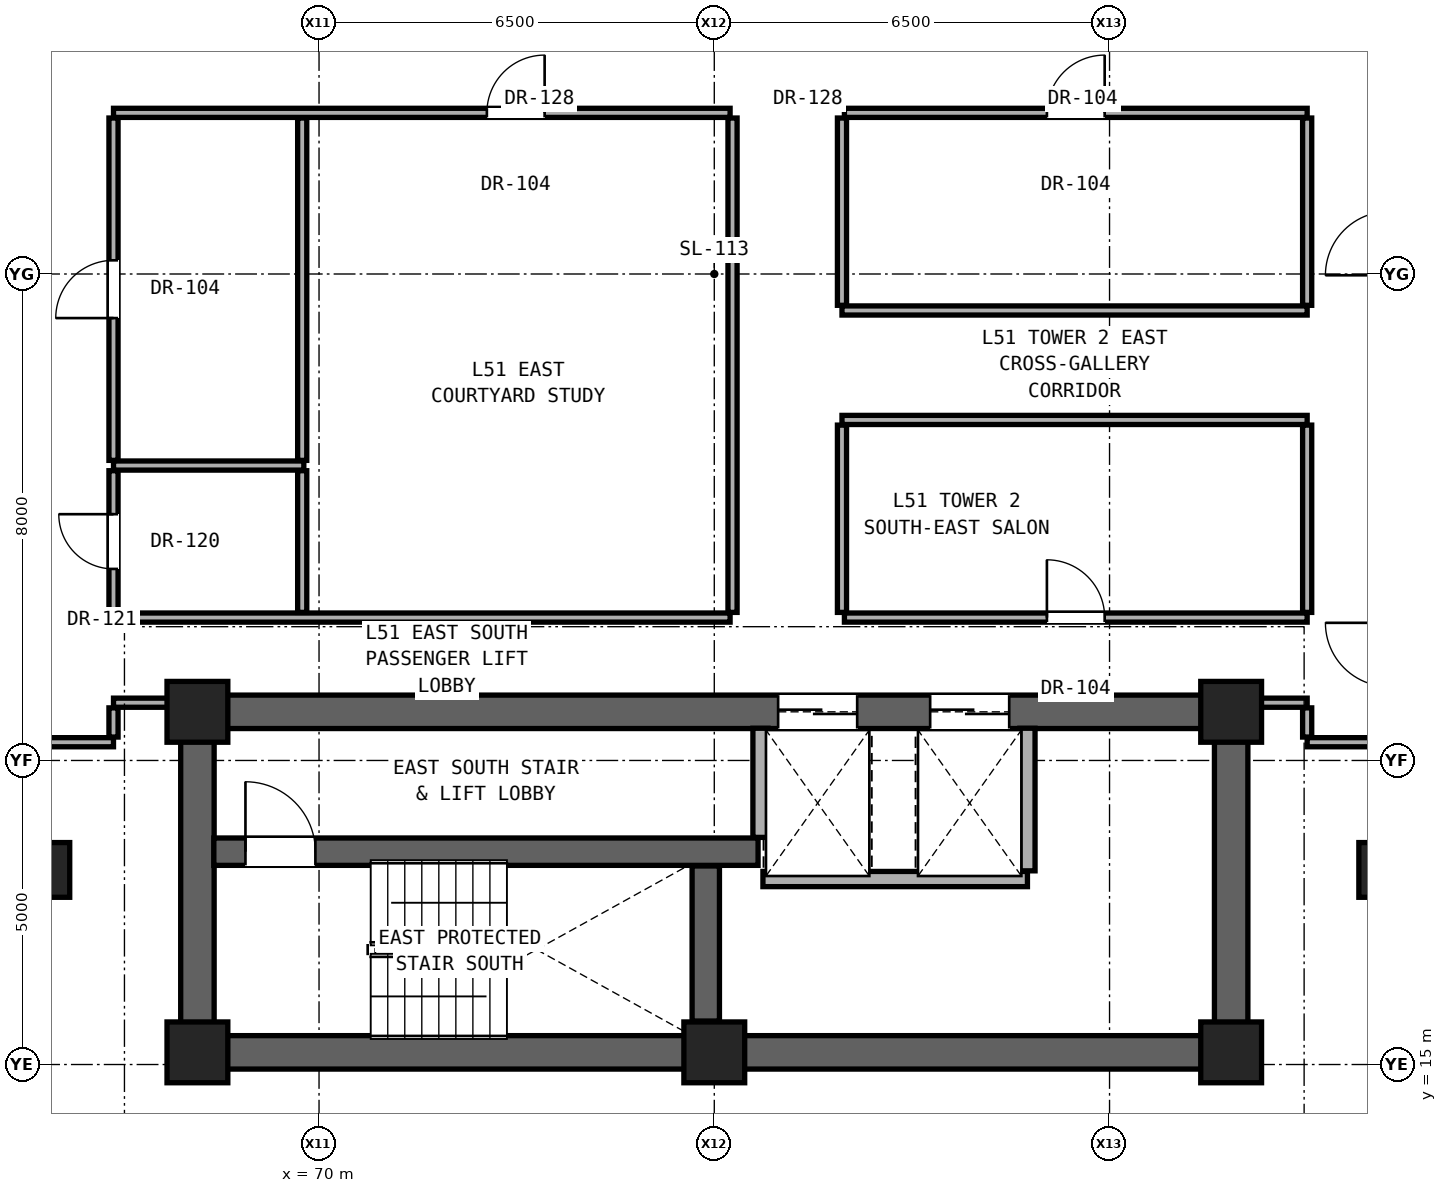
"""IFC4 building model, lengths in metres.
Left out: names, types, materials, properties, quantities, classifications, styles, units other than length and angle.
Written with IfcOpenShell. Run it as: python <this file> out.ifc"""

import sys

from ifc_helpers import new_model, si_unit, direction, frame, frame_2d, origin, origin_2d, place, context, subcontext, project, spatial, rectangle, extrude, element, fill, save


model = new_model("IFC4")
c1 = context("Model", 3, precision=1e-05, world=origin(), true_north=direction((0.0, 1.0)))
c2 = subcontext(c1, "Body", "Model", "MODEL_VIEW")
j1 = project(units=[si_unit("LENGTHUNIT", "METRE"), si_unit("PLANEANGLEUNIT", "RADIAN")], contexts=[c1])
p1 = place(None, origin())
s1 = spatial("IfcSite", under=j1, at=p1, CompositionType="ELEMENT")
p2 = place(p1, origin())
s2 = spatial("IfcBuilding", under=s1, at=p2, CompositionType="ELEMENT")
p3 = place(p2, frame((0.0, 0.0, 180.4)))
s3 = spatial("IfcBuildingStorey", under=s2, at=p3, CompositionType="ELEMENT", Elevation=180.4)
for number, where, z_axis, x_axis in (
    (1, (68.0, 15.2, 0.0), (0.0, 0.0, 1.0), (1.0, 0.0, 0.0)),
    (2, (76.5, 15.2, 0.0), (0.0, 0.0, 1.0), (1.0, 0.0, 0.0)),
    (3, (85.0, 15.2, 0.0), (0.0, 0.0, 1.0), (1.0, 0.0, 0.0)),
    (4, (68.0, 20.8, 0.0), (0.0, 0.0, 1.0), (1.0, 0.0, 0.0)),
    (5, (85.0, 20.8, 0.0), (0.0, 0.0, 1.0), (1.0, 0.0, 0.0)),
):
    element("IfcColumn", number, at=place(p3, frame(where, z_axis=z_axis, x_axis=x_axis)), inside=s3, PredefinedType="COLUMN", context=c2, shape_type="SweptSolid", body=[
        extrude(rectangle(XDim=1.0, YDim=1.0, at=origin_2d()), origin(), (0.0, 0.0, 1.0), 3.25),
    ])
for number, where, z_axis, x_axis in (
    (6, (65.6, 18.2, 0.0), (0.0, 0.0, 1.0), (1.0, 0.0, 0.0)),
    (7, (87.4, 18.2, 0.0), (0.0, 0.0, 1.0), (1.0, 0.0, 0.0)),
):
    element("IfcColumn", number, at=place(p3, frame(where, z_axis=z_axis, x_axis=x_axis)), inside=s3, PredefinedType="PILASTER", context=c2, shape_type="SweptSolid", body=[
        extrude(rectangle(XDim=0.6, YDim=0.9, at=origin_2d()), origin(), (0.0, 0.0, 1.0), 3.25),
    ])
p4 = place(p3, frame((68.0, 15.2, 0.0), z_axis=(0.0, 0.0, 1.0), x_axis=(1.0, 0.0, 0.0)))
e8 = element("IfcWall", 8, at=p4, inside=s3, PredefinedType="SHEAR", context=c2, shape_type="SweptSolid", body=[
    extrude(rectangle(XDim=17.0, YDim=0.55, at=frame_2d((8.5, 0.0))), origin(), (0.0, 0.0, 1.0), 3.05),
])
for number, where, z_axis, x_axis in (
    (9, (68.0, 15.2, 0.0), (0.0, 0.0, 1.0), (0.0, 1.0, 0.0)),
    (10, (85.0, 15.2, 0.0), (0.0, 0.0, 1.0), (0.0, 1.0, 0.0)),
):
    element("IfcWall", number, at=place(p3, frame(where, z_axis=z_axis, x_axis=x_axis)), inside=s3, PredefinedType="SHEAR", context=c2, shape_type="SweptSolid", body=[
        extrude(rectangle(XDim=5.6, YDim=0.55, at=frame_2d((2.8, 0.0))), origin(), (0.0, 0.0, 1.0), 3.05),
    ])
p5 = place(p3, frame((68.0, 20.8, 0.0), z_axis=(0.0, 0.0, 1.0), x_axis=(1.0, 0.0, 0.0)))
e11 = element("IfcWall", 11, at=p5, inside=s3, PredefinedType="SHEAR", context=c2, shape_type="SweptSolid", body=[
    extrude(rectangle(XDim=17.0, YDim=0.55, at=frame_2d((8.5, 0.0))), origin(), (0.0, 0.0, 1.0), 3.05),
])
p6 = place(p5, frame((9.55, 0.0, 0.0)))
e12 = element("IfcOpeningElement", 12, at=p6, cuts=e11, PredefinedType="OPENING", context=c2, shape_type="SweptSolid", body=[
    extrude(rectangle(XDim=1.3, YDim=2.3, at=frame_2d((0.65, 1.15))), frame((0.0, 0.285, 0.0), z_axis=(0.0, -1.0, 0.0), x_axis=(1.0, 0.0, 0.0)), (0.0, 0.0, 1.0), 0.57),
])
p7 = place(p5, frame((12.05, 0.0, 0.0)))
e13 = element("IfcOpeningElement", 13, at=p7, cuts=e11, PredefinedType="OPENING", context=c2, shape_type="SweptSolid", body=[
    extrude(rectangle(XDim=1.3, YDim=2.3, at=frame_2d((0.65, 1.15))), frame((0.0, 0.285, 0.0), z_axis=(0.0, -1.0, 0.0), x_axis=(1.0, 0.0, 0.0)), (0.0, 0.0, 1.0), 0.57),
])
p8 = place(p3, frame((77.3, 18.05, 0.0), z_axis=(0.0, 0.0, 1.0), x_axis=(1.0, 0.0, 0.0)))
e14 = element("IfcWall", 14, at=p8, inside=s3, PredefinedType="SOLIDWALL", context=c2, shape_type="SweptSolid", body=[
    extrude(rectangle(XDim=4.35, YDim=0.25, at=frame_2d((2.175, 0.0))), origin(), (0.0, 0.0, 1.0), 3.05),
])
p9 = place(p3, frame((68.27, 18.5, 0.0), z_axis=(0.0, 0.0, 1.0), x_axis=(1.0, 0.0, 0.0)))
e15 = element("IfcWall", 15, at=p9, inside=s3, PredefinedType="SHEAR", context=c2, shape_type="SweptSolid", body=[
    extrude(rectangle(XDim=8.95, YDim=0.45, at=frame_2d((4.475, 0.0))), origin(), (0.0, 0.0, 1.0), 3.05),
])
p10 = place(p9, frame((0.52, 0.0, 0.0)))
e16 = element("IfcOpeningElement", 16, at=p10, cuts=e15, PredefinedType="OPENING", context=c2, shape_type="SweptSolid", body=[
    extrude(rectangle(XDim=1.15, YDim=2.2, at=frame_2d((0.575, 1.1))), frame((0.0, 0.235, 0.0), z_axis=(0.0, -1.0, 0.0), x_axis=(1.0, 0.0, 0.0)), (0.0, 0.0, 1.0), 0.47),
])
p11 = place(p3, frame((65.25, 20.3, 0.0), z_axis=(0.0, 0.0, 1.0), x_axis=(1.0, 0.0, 0.0)))
e17 = element("IfcWall", 17, at=p11, inside=s3, PredefinedType="PARTITIONING", context=c2, shape_type="SweptSolid", body=[
    extrude(rectangle(XDim=1.37, YDim=0.15, at=frame_2d((0.685, 0.0))), origin(), (0.0, 0.0, 1.0), 3.05),
])
p12 = place(p3, frame((86.25, 20.3, 0.0), z_axis=(0.0, 0.0, 1.0), x_axis=(1.0, 0.0, 0.0)))
e18 = element("IfcWall", 18, at=p12, inside=s3, PredefinedType="PARTITIONING", context=c2, shape_type="SweptSolid", body=[
    extrude(rectangle(XDim=1.35, YDim=0.15, at=frame_2d((0.675, 0.0))), origin(), (0.0, 0.0, 1.0), 3.05),
])
p13 = place(p3, frame((66.62, 20.95, 0.0), z_axis=(0.0, 0.0, 1.0), x_axis=(1.0, 0.0, 0.0)))
e19 = element("IfcWall", 19, at=p13, inside=s3, PredefinedType="PARTITIONING", context=c2, shape_type="SweptSolid", body=[
    extrude(rectangle(XDim=1.11, YDim=0.15, at=frame_2d((0.555, 0.0))), origin(), (0.0, 0.0, 1.0), 2.442),
])
p14 = place(p3, frame((85.27, 20.95, 0.0), z_axis=(0.0, 0.0, 1.0), x_axis=(1.0, 0.0, 0.0)))
e20 = element("IfcWall", 20, at=p14, inside=s3, PredefinedType="PARTITIONING", context=c2, shape_type="SweptSolid", body=[
    extrude(rectangle(XDim=0.98, YDim=0.15, at=frame_2d((0.49, 0.0))), origin(), (0.0, 0.0, 1.0), 2.442),
])
p15 = place(p3, frame((66.62, 22.35, 0.0), z_axis=(0.0, 0.0, 1.0), x_axis=(1.0, 0.0, 0.0)))
e21 = element("IfcWall", 21, at=p15, inside=s3, PredefinedType="PARTITIONING", context=c2, shape_type="SweptSolid", body=[
    extrude(rectangle(XDim=10.14, YDim=0.15, at=frame_2d((5.07, 0.0))), origin(), (0.0, 0.0, 1.0), 2.186),
])
p16 = place(p3, frame((78.64, 22.35, 0.0), z_axis=(0.0, 0.0, 1.0), x_axis=(1.0, 0.0, 0.0)))
e22 = element("IfcWall", 22, at=p16, inside=s3, PredefinedType="PARTITIONING", context=c2, shape_type="SweptSolid", body=[
    extrude(rectangle(XDim=7.61, YDim=0.15, at=frame_2d((3.805, 0.0))), origin(), (0.0, 0.0, 1.0), 2.186),
])
p17 = place(p16, frame((3.33, 0.0, 0.0)))
e23 = element("IfcOpeningElement", 23, at=p17, cuts=e22, PredefinedType="OPENING", context=c2, shape_type="SweptSolid", body=[
    extrude(rectangle(XDim=0.95, YDim=2.15, at=frame_2d((0.475, 1.075))), frame((0.0, 0.085, 0.0), z_axis=(0.0, -1.0, 0.0), x_axis=(1.0, 0.0, 0.0)), (0.0, 0.0, 1.0), 0.17),
])
p18 = place(p3, frame((66.62, 24.85, 0.0), z_axis=(0.0, 0.0, 1.0), x_axis=(1.0, 0.0, 0.0)))
e24 = element("IfcWall", 24, at=p18, inside=s3, PredefinedType="PARTITIONING", context=c2, shape_type="SweptSolid", body=[
    extrude(rectangle(XDim=3.13, YDim=0.15, at=frame_2d((1.565, 0.0))), origin(), (0.0, 0.0, 1.0), 2.186),
])
for number, where, z_axis, x_axis in (
    (25, (78.6, 25.6, 0.0), (0.0, 0.0, 1.0), (1.0, 0.0, 0.0)),
    (26, (78.6, 27.4, 0.0), (0.0, 0.0, 1.0), (1.0, 0.0, 0.0)),
):
    element("IfcWall", number, at=place(p3, frame(where, z_axis=z_axis, x_axis=x_axis)), inside=s3, PredefinedType="PARTITIONING", context=c2, shape_type="SweptSolid", body=[
        extrude(rectangle(XDim=7.65, YDim=0.15, at=frame_2d((3.825, 0.0))), origin(), (0.0, 0.0, 1.0), 2.186),
    ])
p19 = place(p3, frame((66.62, 30.65, 0.0), z_axis=(0.0, 0.0, 1.0), x_axis=(1.0, 0.0, 0.0)))
e27 = element("IfcWall", 27, at=p19, inside=s3, PredefinedType="PARTITIONING", context=c2, shape_type="SweptSolid", body=[
    extrude(rectangle(XDim=10.14, YDim=0.15, at=frame_2d((5.07, 0.0))), origin(), (0.0, 0.0, 1.0), 2.186),
])
p20 = place(p19, frame((6.14, 0.0, 0.0)))
e28 = element("IfcOpeningElement", 28, at=p20, cuts=e27, PredefinedType="OPENING", context=c2, shape_type="SweptSolid", body=[
    extrude(rectangle(XDim=0.95, YDim=2.15, at=frame_2d((0.475, 1.075))), frame((0.0, 0.085, 0.0), z_axis=(0.0, -1.0, 0.0), x_axis=(1.0, 0.0, 0.0)), (0.0, 0.0, 1.0), 0.17),
])
p21 = place(p3, frame((78.64, 30.65, 0.0), z_axis=(0.0, 0.0, 1.0), x_axis=(1.0, 0.0, 0.0)))
e29 = element("IfcWall", 29, at=p21, inside=s3, PredefinedType="PARTITIONING", context=c2, shape_type="SweptSolid", body=[
    extrude(rectangle(XDim=7.61, YDim=0.15, at=frame_2d((3.805, 0.0))), origin(), (0.0, 0.0, 1.0), 2.186),
])
p22 = place(p21, frame((3.33, 0.0, 0.0)))
e30 = element("IfcOpeningElement", 30, at=p22, cuts=e29, PredefinedType="OPENING", context=c2, shape_type="SweptSolid", body=[
    extrude(rectangle(XDim=0.95, YDim=2.15, at=frame_2d((0.475, 1.075))), frame((0.0, 0.085, 0.0), z_axis=(0.0, -1.0, 0.0), x_axis=(1.0, 0.0, 0.0)), (0.0, 0.0, 1.0), 0.17),
])
p23 = place(p3, frame((66.62, 20.385, 0.0), z_axis=(0.0, 0.0, 1.0), x_axis=(0.0, 1.0, 0.0)))
e31 = element("IfcWall", 31, at=p23, inside=s3, PredefinedType="PARTITIONING", context=c2, shape_type="SweptSolid", body=[
    extrude(rectangle(XDim=0.48, YDim=0.15, at=frame_2d((0.24, 0.0))), origin(), (0.0, 0.0, 1.0), 2.442),
])
p24 = place(p3, frame((66.62, 22.435, 0.0), z_axis=(0.0, 0.0, 1.0), x_axis=(0.0, 1.0, 0.0)))
e32 = element("IfcWall", 32, at=p24, inside=s3, PredefinedType="PARTITIONING", context=c2, shape_type="SweptSolid", body=[
    extrude(rectangle(XDim=2.33, YDim=0.15, at=frame_2d((1.165, 0.0))), origin(), (0.0, 0.0, 1.0), 3.05),
])
p25 = place(p24, frame((0.715, 0.0, 0.0)))
e33 = element("IfcOpeningElement", 33, at=p25, cuts=e32, PredefinedType="OPENING", context=c2, shape_type="SweptSolid", body=[
    extrude(rectangle(XDim=0.9, YDim=2.1, at=frame_2d((0.45, 1.05))), frame((0.0, 0.085, 0.0), z_axis=(0.0, -1.0, 0.0), x_axis=(1.0, 0.0, 0.0)), (0.0, 0.0, 1.0), 0.17),
])
p26 = place(p3, frame((66.62, 24.935, 0.0), z_axis=(0.0, 0.0, 1.0), x_axis=(0.0, 1.0, 0.0)))
e34 = element("IfcWall", 34, at=p26, inside=s3, PredefinedType="PARTITIONING", context=c2, shape_type="SweptSolid", body=[
    extrude(rectangle(XDim=5.63, YDim=0.15, at=frame_2d((2.815, 0.0))), origin(), (0.0, 0.0, 1.0), 2.346),
])
p27 = place(p26, frame((2.34, 0.0, 0.0)))
e35 = element("IfcOpeningElement", 35, at=p27, cuts=e34, PredefinedType="OPENING", context=c2, shape_type="SweptSolid", body=[
    extrude(rectangle(XDim=0.95, YDim=2.15, at=frame_2d((0.475, 1.075))), frame((0.0, 0.085, 0.0), z_axis=(0.0, -1.0, 0.0), x_axis=(1.0, 0.0, 0.0)), (0.0, 0.0, 1.0), 0.17),
])
p28 = place(p3, frame((69.723, 22.435, 0.0), z_axis=(0.0, 0.0, 1.0), x_axis=(0.0, 1.0, 0.0)))
e36 = element("IfcWall", 36, at=p28, inside=s3, PredefinedType="PARTITIONING", context=c2, shape_type="SweptSolid", body=[
    extrude(rectangle(XDim=2.33, YDim=0.15, at=frame_2d((1.165, 0.0))), origin(), (0.0, 0.0, 1.0), 3.05),
])
p29 = place(p3, frame((69.723, 24.935, 0.0), z_axis=(0.0, 0.0, 1.0), x_axis=(0.0, 1.0, 0.0)))
e37 = element("IfcWall", 37, at=p29, inside=s3, PredefinedType="PARTITIONING", context=c2, shape_type="SweptSolid", body=[
    extrude(rectangle(XDim=5.63, YDim=0.15, at=frame_2d((2.815, 0.0))), origin(), (0.0, 0.0, 1.0), 2.186),
])
p30 = place(p3, frame((76.36, 15.715, 0.0), z_axis=(0.0, 0.0, 1.0), x_axis=(0.0, 1.0, 0.0)))
e38 = element("IfcWall", 38, at=p30, inside=s3, PredefinedType="SHEAR", context=c2, shape_type="SweptSolid", body=[
    extrude(rectangle(XDim=2.55, YDim=0.45, at=frame_2d((1.275, 0.0))), origin(), (0.0, 0.0, 1.0), 3.05),
])
p31 = place(p3, frame((76.8, 22.435, 0.0), z_axis=(0.0, 0.0, 1.0), x_axis=(0.0, 1.0, 0.0)))
e39 = element("IfcWall", 39, at=p31, inside=s3, PredefinedType="PARTITIONING", context=c2, shape_type="SweptSolid", body=[
    extrude(rectangle(XDim=8.13, YDim=0.15, at=frame_2d((4.065, 0.0))), origin(), (0.0, 0.0, 1.0), 2.186),
])
p32 = place(p3, frame((77.26, 18.735, 0.0), z_axis=(0.0, 0.0, 1.0), x_axis=(0.0, 1.0, 0.0)))
e40 = element("IfcWall", 40, at=p32, inside=s3, PredefinedType="SOLIDWALL", context=c2, shape_type="SweptSolid", body=[
    extrude(rectangle(XDim=1.795, YDim=0.25, at=frame_2d((0.897, 0.0))), origin(), (0.0, 0.0, 1.0), 3.05),
])
p33 = place(p3, frame((78.6, 22.435, 0.0), z_axis=(0.0, 0.0, 1.0), x_axis=(0.0, 1.0, 0.0)))
e41 = element("IfcWall", 41, at=p33, inside=s3, PredefinedType="PARTITIONING", context=c2, shape_type="SweptSolid", body=[
    extrude(rectangle(XDim=3.08, YDim=0.15, at=frame_2d((1.54, 0.0))), origin(), (0.0, 0.0, 1.0), 3.05),
])
p34 = place(p3, frame((78.6, 27.485, 0.0), z_axis=(0.0, 0.0, 1.0), x_axis=(0.0, 1.0, 0.0)))
e42 = element("IfcWall", 42, at=p34, inside=s3, PredefinedType="PARTITIONING", context=c2, shape_type="SweptSolid", body=[
    extrude(rectangle(XDim=3.08, YDim=0.15, at=frame_2d((1.54, 0.0))), origin(), (0.0, 0.0, 1.0), 2.186),
])
p35 = place(p3, frame((81.65, 18.185, 0.0), z_axis=(0.0, 0.0, 1.0), x_axis=(0.0, 1.0, 0.0)))
e43 = element("IfcWall", 43, at=p35, inside=s3, PredefinedType="SOLIDWALL", context=c2, shape_type="SweptSolid", body=[
    extrude(rectangle(XDim=2.345, YDim=0.25, at=frame_2d((1.172, 0.0))), origin(), (0.0, 0.0, 1.0), 3.05),
])
p36 = place(p3, frame((86.25, 20.385, 0.0), z_axis=(0.0, 0.0, 1.0), x_axis=(0.0, 1.0, 0.0)))
e44 = element("IfcWall", 44, at=p36, inside=s3, PredefinedType="PARTITIONING", context=c2, shape_type="SweptSolid", body=[
    extrude(rectangle(XDim=0.48, YDim=0.15, at=frame_2d((0.24, 0.0))), origin(), (0.0, 0.0, 1.0), 2.442),
])
p37 = place(p3, frame((86.25, 22.435, 0.0), z_axis=(0.0, 0.0, 1.0), x_axis=(0.0, 1.0, 0.0)))
e45 = element("IfcWall", 45, at=p37, inside=s3, PredefinedType="PARTITIONING", context=c2, shape_type="SweptSolid", body=[
    extrude(rectangle(XDim=3.08, YDim=0.15, at=frame_2d((1.54, 0.0))), origin(), (0.0, 0.0, 1.0), 3.05),
])
p38 = place(p3, frame((86.25, 27.485, 0.0), z_axis=(0.0, 0.0, 1.0), x_axis=(0.0, 1.0, 0.0)))
e46 = element("IfcWall", 46, at=p38, inside=s3, PredefinedType="PARTITIONING", context=c2, shape_type="SweptSolid", body=[
    extrude(rectangle(XDim=3.08, YDim=0.15, at=frame_2d((1.54, 0.0))), origin(), (0.0, 0.0, 1.0), 2.346),
])
p39 = place(p10, origin())
e47 = element("IfcDoor", 47, at=p39, inside=s3, OperationType="SINGLE_SWING_LEFT", PredefinedType="DOOR", context=c2, shape_type="SweptSolid", body=[
    extrude(rectangle(XDim=1.15, YDim=2.2, at=frame_2d((0.575, 1.1))), frame((0.0, 0.025, 0.0), z_axis=(0.0, -1.0, 0.0), x_axis=(1.0, 0.0, 0.0)), (0.0, 0.0, 1.0), 0.05),
])
fill(e16, e47)
p40 = place(p25, origin())
e48 = element("IfcDoor", 48, at=p40, inside=s3, OperationType="SINGLE_SWING_RIGHT", PredefinedType="DOOR", context=c2, shape_type="SweptSolid", body=[
    extrude(rectangle(XDim=0.9, YDim=2.1, at=frame_2d((0.45, 1.05))), frame((0.0, 0.025, 0.0), z_axis=(0.0, -1.0, 0.0), x_axis=(1.0, 0.0, 0.0)), (0.0, 0.0, 1.0), 0.05),
])
fill(e33, e48)
p41 = place(p27, origin())
e49 = element("IfcDoor", 49, at=p41, inside=s3, OperationType="SINGLE_SWING_LEFT", PredefinedType="DOOR", context=c2, shape_type="SweptSolid", body=[
    extrude(rectangle(XDim=0.95, YDim=2.15, at=frame_2d((0.475, 1.075))), frame((0.0, 0.025, 0.0), z_axis=(0.0, -1.0, 0.0), x_axis=(1.0, 0.0, 0.0)), (0.0, 0.0, 1.0), 0.05),
])
fill(e35, e49)
p42 = place(p20, origin())
e50 = element("IfcDoor", 50, at=p42, inside=s3, OperationType="SINGLE_SWING_RIGHT", PredefinedType="DOOR", context=c2, shape_type="SweptSolid", body=[
    extrude(rectangle(XDim=0.95, YDim=2.15, at=frame_2d((0.475, 1.075))), frame((0.0, 0.025, 0.0), z_axis=(0.0, -1.0, 0.0), x_axis=(1.0, 0.0, 0.0)), (0.0, 0.0, 1.0), 0.05),
])
fill(e28, e50)
p43 = place(p17, origin())
e51 = element("IfcDoor", 51, at=p43, inside=s3, OperationType="SINGLE_SWING_LEFT", PredefinedType="DOOR", context=c2, shape_type="SweptSolid", body=[
    extrude(rectangle(XDim=0.95, YDim=2.15, at=frame_2d((0.475, 1.075))), frame((0.0, 0.025, 0.0), z_axis=(0.0, -1.0, 0.0), x_axis=(1.0, 0.0, 0.0)), (0.0, 0.0, 1.0), 0.05),
])
fill(e23, e51)
p44 = place(p22, origin())
e52 = element("IfcDoor", 52, at=p44, inside=s3, OperationType="SINGLE_SWING_RIGHT", PredefinedType="DOOR", context=c2, shape_type="SweptSolid", body=[
    extrude(rectangle(XDim=0.95, YDim=2.15, at=frame_2d((0.475, 1.075))), frame((0.0, 0.025, 0.0), z_axis=(0.0, -1.0, 0.0), x_axis=(1.0, 0.0, 0.0)), (0.0, 0.0, 1.0), 0.05),
])
fill(e30, e52)
p45 = place(p6, origin())
e53 = element("IfcDoor", 53, at=p45, inside=s3, OperationType="DOUBLE_DOOR_SLIDING", PredefinedType="DOOR", context=c2, shape_type="SweptSolid", body=[
    extrude(rectangle(XDim=1.3, YDim=2.3, at=frame_2d((0.65, 1.15))), frame((0.0, 0.025, 0.0), z_axis=(0.0, -1.0, 0.0), x_axis=(1.0, 0.0, 0.0)), (0.0, 0.0, 1.0), 0.05),
])
fill(e12, e53)
p46 = place(p7, origin())
e54 = element("IfcDoor", 54, at=p46, inside=s3, OperationType="DOUBLE_DOOR_SLIDING", PredefinedType="DOOR", context=c2, shape_type="SweptSolid", body=[
    extrude(rectangle(XDim=1.3, YDim=2.3, at=frame_2d((0.65, 1.15))), frame((0.0, 0.025, 0.0), z_axis=(0.0, -1.0, 0.0), x_axis=(1.0, 0.0, 0.0)), (0.0, 0.0, 1.0), 0.05),
])
fill(e13, e54)
save(model, sys.argv[1])
